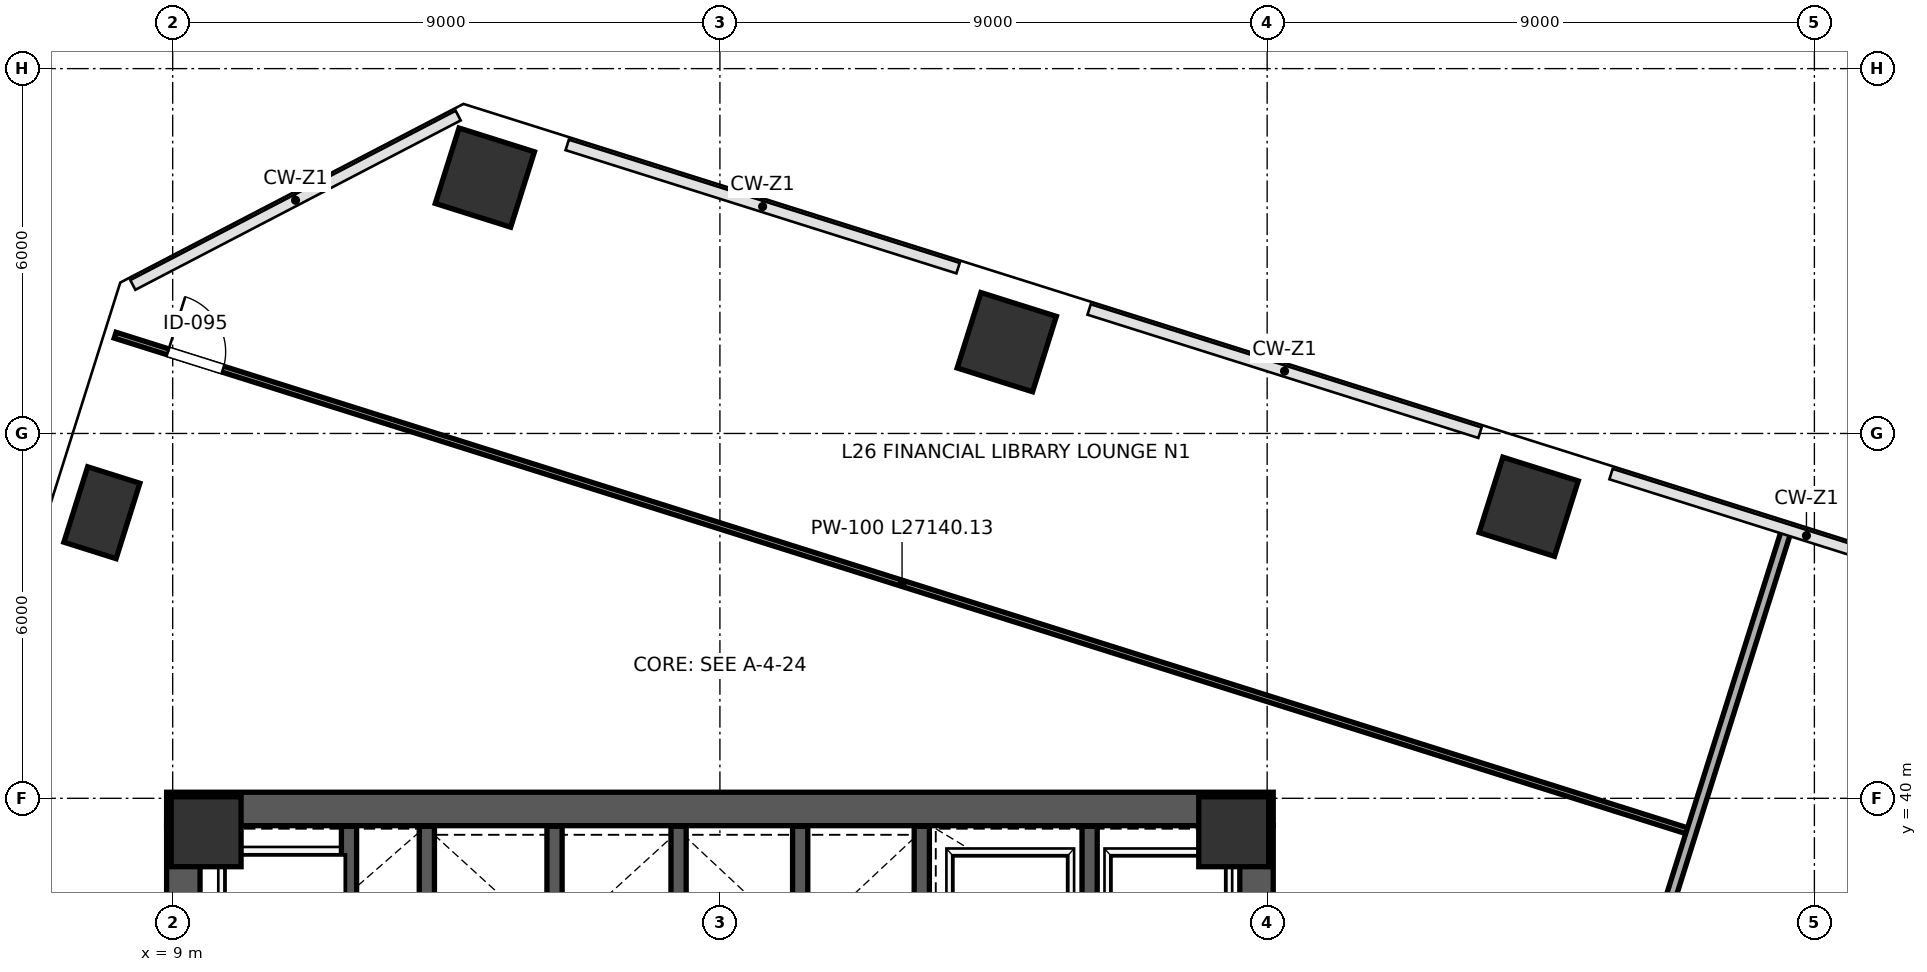
"""IFC4 building model, lengths in metres.
Left out: names, types, materials, properties, quantities, classifications, styles, units other than length and angle.
Written with IfcOpenShell. Run it as: python <this file> out.ifc"""

import sys

from ifc_helpers import new_model, si_unit, direction, frame, frame_2d, origin, origin_2d, place, context, subcontext, project, spatial, rectangle, extrude, source, transform, mapped, element, fill, save


model = new_model("IFC4")
c1 = context("Model", 3, precision=1e-05, world=origin(), true_north=direction((0.0, 1.0)))
c2 = subcontext(c1, "Body", "Model", "MODEL_VIEW")
j1 = project(units=[si_unit("LENGTHUNIT", "METRE"), si_unit("PLANEANGLEUNIT", "RADIAN")], contexts=[c1])
p1 = place(None, origin())
s1 = spatial("IfcSite", under=j1, at=p1, CompositionType="ELEMENT")
p2 = place(p1, origin())
s2 = spatial("IfcBuilding", under=s1, at=p2, CompositionType="ELEMENT")
p3 = place(p2, frame((0.0, 0.0, 116.8)))
s3 = spatial("IfcBuildingStorey", under=s2, at=p3, CompositionType="ELEMENT", Elevation=116.8)
m1 = source(origin(), c2, "Body", "SweptSolid", [
    extrude(rectangle(XDim=1.15, YDim=1.15, at=origin_2d()), origin(), (0.0, 0.0, 1.0), 5.398),
])
for number, where, z_axis, x_axis in (
    (1, (9.55, 39.45, 0.001), (0.0, 0.0, 1.0), (1.0, 0.0, 0.0)),
    (2, (26.45, 39.45, 0.001), (0.0, 0.0, 1.0), (1.0, 0.0, 0.0)),
):
    element("IfcColumn", number, at=place(p3, frame(where, z_axis=z_axis, x_axis=x_axis)), inside=s3, PredefinedType="COLUMN", context=c2, shape_type="MappedRepresentation", body=[
        mapped(m1, transform((0.0, 0.0, 0.0), scale=1.0)),
    ])
m2 = source(origin(), c2, "Body", "SweptSolid", [
    extrude(rectangle(XDim=1.3, YDim=1.3, at=origin_2d()), origin(), (0.0, 0.0, 1.0), 5.398),
])
for number, where, z_axis, x_axis in (
    (3, (14.134, 50.208, 0.001), (0.0, 0.0, 1.0), (-0.954, 0.301, 0.0)),
    (4, (22.718, 47.501, 0.001), (0.0, 0.0, 1.0), (-0.954, 0.301, 0.0)),
    (5, (31.301, 44.795, 0.001), (0.0, 0.0, 1.0), (-0.954, 0.301, 0.0)),
):
    element("IfcColumn", number, at=place(p3, frame(where, z_axis=z_axis, x_axis=x_axis)), inside=s3, PredefinedType="COLUMN", context=c2, shape_type="MappedRepresentation", body=[
        mapped(m2, transform((0.0, 0.0, 0.0), scale=1.0)),
    ])
m3 = source(origin(), c2, "Body", "SweptSolid", [
    extrude(rectangle(XDim=0.9, YDim=1.3, at=origin_2d()), origin(), (0.0, 0.0, 1.0), 5.398),
])
p4 = place(p3, frame((7.835, 44.697, 0.001), z_axis=(0.0, 0.0, 1.0), x_axis=(-0.953716950748, 0.300705799504, 0.0)))
e6 = element("IfcColumn", 6, at=p4, inside=s3, PredefinedType="PILASTER", context=c2, shape_type="MappedRepresentation", body=[
    mapped(m3, transform((0.0, 0.0, 0.0), scale=1.0)),
])
p5 = place(p3, frame((9.175, 24.45, 0.0), z_axis=(0.0, 0.0, 1.0), x_axis=(0.0, 1.0, 0.0)))
e7 = element("IfcWall", 7, at=p5, inside=s3, PredefinedType="SHEAR", context=c2, shape_type="SweptSolid", body=[
    extrude(rectangle(XDim=15.1, YDim=0.55, at=frame_2d((7.55, 0.0))), origin(), (0.0, 0.0, 1.0), 5.12),
])
p6 = place(p3, frame((26.825, 24.45, 0.0), z_axis=(0.0, 0.0, 1.0), x_axis=(0.0, 1.0, 0.0)))
e8 = element("IfcWall", 8, at=p6, inside=s3, PredefinedType="SHEAR", context=c2, shape_type="SweptSolid", body=[
    extrude(rectangle(XDim=15.1, YDim=0.55, at=frame_2d((7.55, 0.0))), origin(), (0.0, 0.0, 1.0), 5.12),
])
p7 = place(p6, frame((8.6, 0.0, 0.0)))
e9 = element("IfcOpeningElement", 9, at=p7, cuts=e8, PredefinedType="OPENING", context=c2, shape_type="SweptSolid", body=[
    extrude(rectangle(XDim=1.15, YDim=2.2, at=frame_2d((0.575, 1.1))), frame((0.0, 0.285, 0.0), z_axis=(0.0, -1.0, 0.0), x_axis=(1.0, 0.0, 0.0)), (0.0, 0.0, 1.0), 0.57),
])
p8 = place(p3, frame((8.9, 39.825, 0.0), z_axis=(0.0, 0.0, 1.0), x_axis=(1.0, 0.0, 0.0)))
e10 = element("IfcWall", 10, at=p8, inside=s3, PredefinedType="SHEAR", context=c2, shape_type="SweptSolid", body=[
    extrude(rectangle(XDim=18.2, YDim=0.55, at=frame_2d((9.1, 0.0))), origin(), (0.0, 0.0, 1.0), 5.12),
])
p9 = place(p3, frame((21.32, 32.12, 0.0), z_axis=(0.0, 0.0, 1.0), x_axis=(0.0, 1.0, 0.0)))
e11 = element("IfcWall", 11, at=p9, inside=s3, PredefinedType="SHEAR", context=c2, shape_type="SweptSolid", body=[
    extrude(rectangle(XDim=7.42, YDim=0.25, at=frame_2d((3.71, 0.0))), origin(), (0.0, 0.0, 1.0), 5.12),
])
p10 = place(p9, frame((1.4, 0.0, 0.0)))
e12 = element("IfcOpeningElement", 12, at=p10, cuts=e11, PredefinedType="OPENING", context=c2, shape_type="SweptSolid", body=[
    extrude(rectangle(XDim=1.15, YDim=2.2, at=frame_2d((0.575, 1.1))), frame((0.0, 0.135, 0.0), z_axis=(0.0, -1.0, 0.0), x_axis=(1.0, 0.0, 0.0)), (0.0, 0.0, 1.0), 0.27),
])
p11 = place(p3, frame((11.9, 36.31, 0.0), z_axis=(0.0, 0.0, 1.0), x_axis=(0.0, 1.0, 0.0)))
e13 = element("IfcWall", 13, at=p11, inside=s3, PredefinedType="SHEAR", context=c2, shape_type="SweptSolid", body=[
    extrude(rectangle(XDim=3.23, YDim=0.25, at=frame_2d((1.615, 0.0))), origin(), (0.0, 0.0, 1.0), 5.12),
])
p12 = place(p3, frame((24.08, 36.48, 0.0), z_axis=(0.0, 0.0, 1.0), x_axis=(0.0, 1.0, 0.0)))
e14 = element("IfcWall", 14, at=p12, inside=s3, PredefinedType="SHEAR", context=c2, shape_type="SweptSolid", body=[
    extrude(rectangle(XDim=3.06, YDim=0.25, at=frame_2d((1.53, 0.0))), origin(), (0.0, 0.0, 1.0), 5.12),
])
for number, where, z_axis, x_axis in (
    (15, (13.18, 35.81, 0.0), (0.0, 0.0, 1.0), (0.0, 1.0, 0.0)),
    (16, (15.28, 35.81, 0.0), (0.0, 0.0, 1.0), (0.0, 1.0, 0.0)),
    (17, (17.32, 35.81, 0.0), (0.0, 0.0, 1.0), (0.0, 1.0, 0.0)),
    (18, (19.32, 35.81, 0.0), (0.0, 0.0, 1.0), (0.0, 1.0, 0.0)),
):
    element("IfcWall", number, at=place(p3, frame(where, z_axis=z_axis, x_axis=x_axis)), inside=s3, PredefinedType="SHEAR", context=c2, shape_type="SweptSolid", body=[
        extrude(rectangle(XDim=3.73, YDim=0.25, at=frame_2d((1.865, 0.0))), origin(), (0.0, 0.0, 1.0), 5.12),
    ])
p13 = place(p3, frame((8.053, 47.616, 0.0), z_axis=(0.0, 0.0, 1.0), x_axis=(0.953717706363, -0.300703402989, 0.0)))
e19 = element("IfcWall", 19, at=p13, inside=s3, PredefinedType="PARTITIONING", context=c2, shape_type="SweptSolid", body=[
    extrude(rectangle(XDim=27.14, YDim=0.1, at=frame_2d((13.57, 0.0))), origin(), (0.0, 0.0, 1.0), 5.12),
])
p14 = place(p13, frame((0.91, 0.0, 0.0)))
e20 = element("IfcOpeningElement", 20, at=p14, cuts=e19, PredefinedType="OPENING", context=c2, shape_type="SweptSolid", body=[
    extrude(rectangle(XDim=0.95, YDim=2.15, at=frame_2d((0.475, 1.075))), frame((0.0, 0.06, 0.0), z_axis=(0.0, -1.0, 0.0), x_axis=(1.0, 0.0, 0.0)), (0.0, 0.0, 1.0), 0.12),
])
p15 = place(p3, frame((29.444, 25.07, 0.0), z_axis=(0.0, 0.0, 1.0), x_axis=(0.300708769024, 0.953716014457, 0.0)))
e21 = element("IfcWall", 21, at=p15, inside=s3, PredefinedType="PARTITIONING", context=c2, shape_type="SweptSolid", body=[
    extrude(rectangle(XDim=20.24, YDim=0.16, at=frame_2d((10.12, 0.0))), origin(), (0.0, 0.0, 1.0), 4.255),
])
m4 = source(origin(), c2, "Body", "SweptSolid", [
    extrude(rectangle(XDim=0.95, YDim=2.15, at=frame_2d((0.475, 1.075))), frame((0.0, 0.025, 0.0), z_axis=(0.0, -1.0, 0.0), x_axis=(1.0, 0.0, 0.0)), (0.0, 0.0, 1.0), 0.05),
])
p16 = place(p14, origin())
e22 = element("IfcDoor", 22, at=p16, inside=s3, OperationType="SINGLE_SWING_LEFT", PredefinedType="DOOR", context=c2, shape_type="MappedRepresentation", body=[
    mapped(m4, transform((0.0, 0.0, 0.0), scale=1.0)),
])
fill(e20, e22)
save(model, sys.argv[1])
